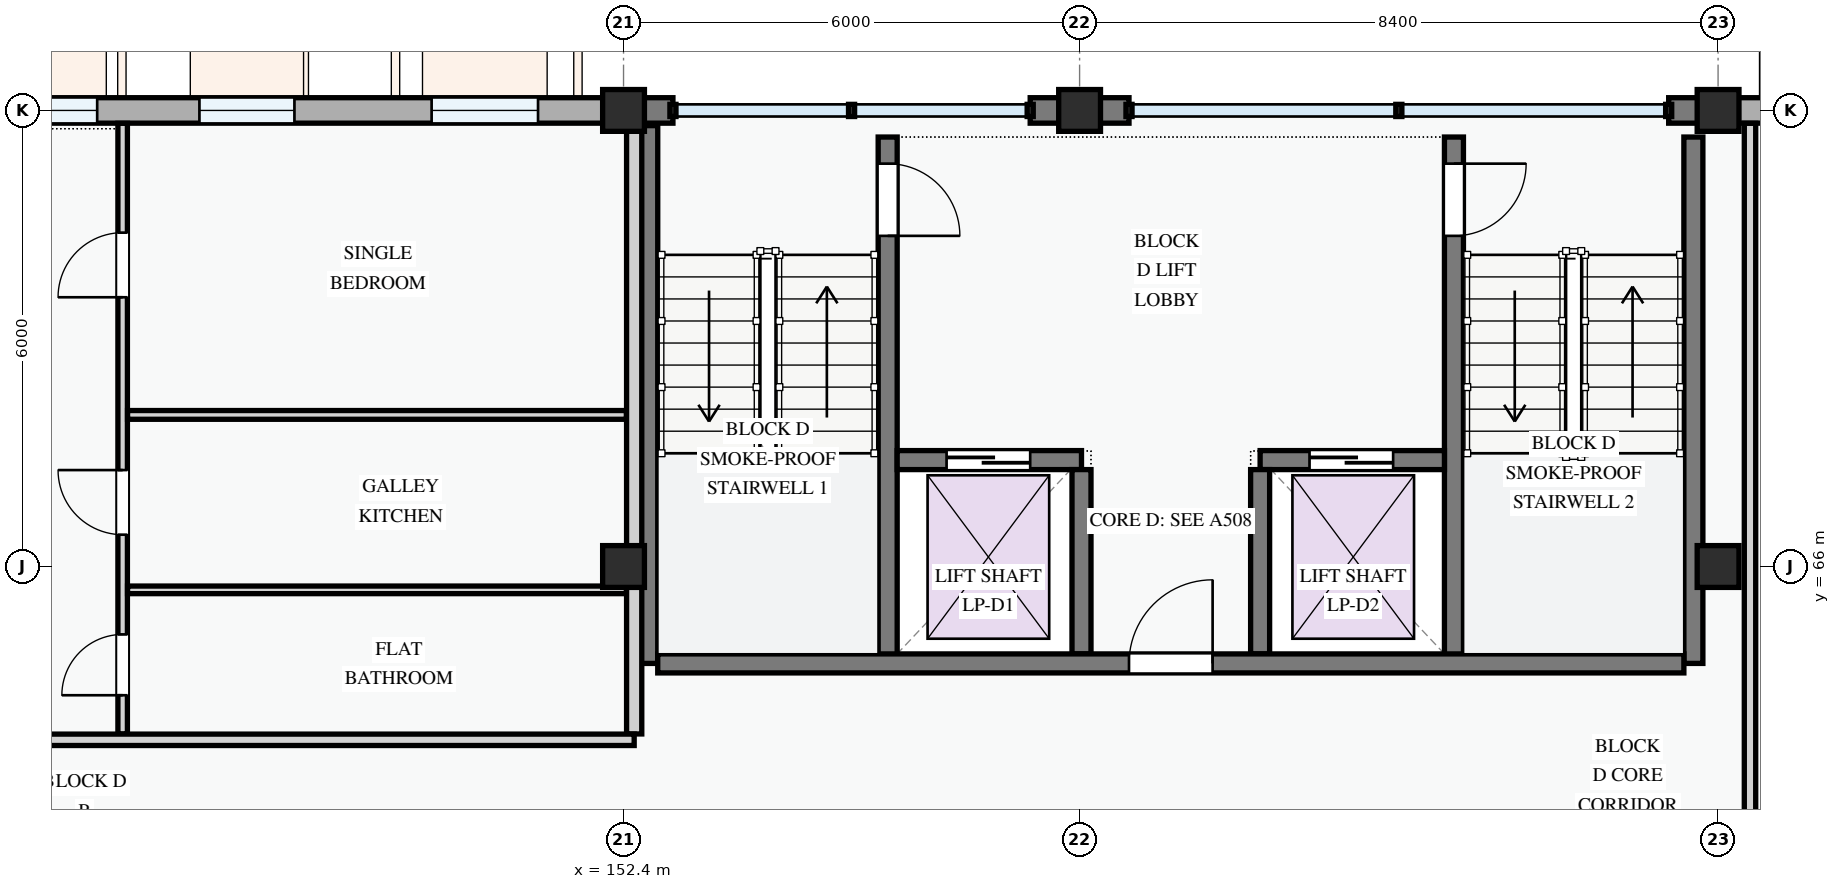
"""IFC4 building model, lengths in metres.
Left out: names, types, materials, properties, quantities, classifications, styles, units other than length and angle.
Written with IfcOpenShell. Run it as: python <this file> out.ifc"""

import sys

from ifc_helpers import new_model, si_unit, direction, frame, frame_2d, origin, origin_2d, place, context, subcontext, project, spatial, rectangle, extrude, element, fill, save


model = new_model("IFC4")
c1 = context("Model", 3, precision=1e-05, world=origin(), true_north=direction((0.0, 1.0)))
c2 = subcontext(c1, "Body", "Model", "MODEL_VIEW")
j1 = project(units=[si_unit("LENGTHUNIT", "METRE"), si_unit("PLANEANGLEUNIT", "RADIAN")], contexts=[c1])
p1 = place(None, origin())
s1 = spatial("IfcSite", under=j1, at=p1, CompositionType="ELEMENT")
p2 = place(p1, origin())
s2 = spatial("IfcBuilding", under=s1, at=p2, CompositionType="ELEMENT")
p3 = place(p2, frame((0.0, 0.0, 8.1)))
s3 = spatial("IfcBuildingStorey", under=s2, at=p3, CompositionType="ELEMENT", Elevation=8.1)
for number, where, z_axis, x_axis in (
    (1, (152.4, 66.0, 0.0), (0.0, 0.0, 1.0), (1.0, 0.0, 0.0)),
    (2, (152.4, 72.0, 0.0), (0.0, 0.0, 1.0), (1.0, 0.0, 0.0)),
    (3, (158.4, 72.0, 0.0), (0.0, 0.0, 1.0), (1.0, 0.0, 0.0)),
    (4, (166.8, 66.0, 0.0), (0.0, 0.0, 1.0), (1.0, 0.0, 0.0)),
    (5, (166.8, 72.0, 0.0), (0.0, 0.0, 1.0), (1.0, 0.0, 0.0)),
):
    element("IfcColumn", number, at=place(p3, frame(where, z_axis=z_axis, x_axis=x_axis)), inside=s3, PredefinedType="COLUMN", context=c2, shape_type="SweptSolid", body=[
        extrude(rectangle(XDim=0.55, YDim=0.55, at=origin_2d()), origin(), (0.0, 0.0, 1.0), 3.3),
    ])
p4 = place(p3, frame((152.4, 72.0, 0.0), z_axis=(0.0, 0.0, 1.0), x_axis=(-1.0, 0.0, 0.0)))
e6 = element("IfcWall", 6, at=p4, inside=s3, PredefinedType="STANDARD", context=c2, shape_type="SweptSolid", body=[
    extrude(rectangle(XDim=8.4, YDim=0.335, at=frame_2d((4.2, 0.0))), origin(), (0.0, 0.0, 1.0), 2.375),
])
p5 = place(p4, frame((1.125, 0.0, 0.78)))
e7 = element("IfcOpeningElement", 7, at=p5, cuts=e6, PredefinedType="OPENING", context=c2, shape_type="SweptSolid", body=[
    extrude(rectangle(XDim=1.4, YDim=1.45, at=frame_2d((0.7, 0.725))), frame((0.0, 0.177, 0.0), z_axis=(0.0, -1.0, 0.0), x_axis=(1.0, 0.0, 0.0)), (0.0, 0.0, 1.0), 0.355),
])
p6 = place(p4, frame((4.33, 0.0, 0.78)))
e8 = element("IfcOpeningElement", 8, at=p6, cuts=e6, PredefinedType="OPENING", context=c2, shape_type="SweptSolid", body=[
    extrude(rectangle(XDim=1.25, YDim=1.45, at=frame_2d((0.625, 0.725))), frame((0.0, 0.177, 0.0), z_axis=(0.0, -1.0, 0.0), x_axis=(1.0, 0.0, 0.0)), (0.0, 0.0, 1.0), 0.355),
])
p7 = place(p4, frame((6.925, 0.0, 0.78)))
e9 = element("IfcOpeningElement", 9, at=p7, cuts=e6, PredefinedType="OPENING", context=c2, shape_type="SweptSolid", body=[
    extrude(rectangle(XDim=0.95, YDim=1.15, at=frame_2d((0.475, 0.575))), frame((0.0, 0.177, 0.0), z_axis=(0.0, -1.0, 0.0), x_axis=(1.0, 0.0, 0.0)), (0.0, 0.0, 1.0), 0.355),
])
p8 = place(p3, frame((174.0, 72.0, 0.0), z_axis=(0.0, 0.0, 1.0), x_axis=(-1.0, 0.0, 0.0)))
e10 = element("IfcWall", 10, at=p8, inside=s3, PredefinedType="STANDARD", context=c2, shape_type="SweptSolid", body=[
    extrude(rectangle(XDim=7.2, YDim=0.335, at=frame_2d((3.6, 0.0))), origin(), (0.0, 0.0, 1.0), 2.375),
])
p9 = place(p8, frame((0.913, 0.0, 0.78)))
e11 = element("IfcOpeningElement", 11, at=p9, cuts=e10, PredefinedType="OPENING", context=c2, shape_type="SweptSolid", body=[
    extrude(rectangle(XDim=1.92, YDim=1.44, at=frame_2d((0.96, 0.72))), frame((0.0, 0.177, 0.0), z_axis=(0.0, -1.0, 0.0), x_axis=(1.0, 0.0, 0.0)), (0.0, 0.0, 1.0), 0.355),
])
p10 = place(p8, frame((3.808, 0.0, 0.78)))
e12 = element("IfcOpeningElement", 12, at=p10, cuts=e10, PredefinedType="OPENING", context=c2, shape_type="SweptSolid", body=[
    extrude(rectangle(XDim=2.58, YDim=1.48, at=frame_2d((1.29, 0.74))), frame((0.0, 0.177, 0.0), z_axis=(0.0, -1.0, 0.0), x_axis=(1.0, 0.0, 0.0)), (0.0, 0.0, 1.0), 0.355),
])
for number, where, z_axis, x_axis in (
    (13, (166.8, 72.0, 0.0), (0.0, 0.0, 1.0), (-1.0, 0.0, 0.0)),
    (14, (159.05, 72.0, 0.0), (0.0, 0.0, 1.0), (-1.0, 0.0, 0.0)),
):
    element("IfcWall", number, at=place(p3, frame(where, z_axis=z_axis, x_axis=x_axis)), inside=s3, PredefinedType="STANDARD", context=c2, shape_type="SweptSolid", body=[
        extrude(rectangle(XDim=0.65, YDim=0.335, at=frame_2d((0.325, 0.0))), origin(), (0.0, 0.0, 1.0), 3.04),
    ])
p11 = place(p3, frame((158.4, 72.0, 0.0), z_axis=(0.0, 0.0, 1.0), x_axis=(-1.0, 0.0, 0.0)))
e15 = element("IfcWall", 15, at=p11, inside=s3, PredefinedType="STANDARD", context=c2, shape_type="SweptSolid", body=[
    extrude(rectangle(XDim=0.65, YDim=0.335, at=frame_2d((0.325, 0.0))), origin(), (0.0, 0.0, 1.0), 3.04),
])
p12 = place(p3, frame((153.05, 72.0, 0.0), z_axis=(0.0, 0.0, 1.0), x_axis=(-1.0, 0.0, 0.0)))
e16 = element("IfcWall", 16, at=p12, inside=s3, PredefinedType="STANDARD", context=c2, shape_type="SweptSolid", body=[
    extrude(rectangle(XDim=0.65, YDim=0.335, at=frame_2d((0.325, 0.0))), origin(), (0.0, 0.0, 1.0), 3.04),
])
p13 = place(p3, frame((155.875, 71.65, 0.0), z_axis=(0.0, 0.0, 1.0), x_axis=(0.0, -1.0, 0.0)))
e17 = element("IfcWall", 17, at=p13, inside=s3, PredefinedType="SHEAR", context=c2, shape_type="SweptSolid", body=[
    extrude(rectangle(XDim=6.925, YDim=0.25, at=frame_2d((3.462, 0.0))), origin(), (0.0, 0.0, 1.0), 3.0),
])
p14 = place(p13, frame((0.35, 0.0, 0.0)))
e18 = element("IfcOpeningElement", 18, at=p14, cuts=e17, PredefinedType="OPENING", context=c2, shape_type="SweptSolid", body=[
    extrude(rectangle(XDim=0.95, YDim=2.1, at=frame_2d((0.475, 1.05))), frame((0.0, 0.135, 0.0), z_axis=(0.0, -1.0, 0.0), x_axis=(1.0, 0.0, 0.0)), (0.0, 0.0, 1.0), 0.27),
])
p15 = place(p3, frame((152.725, 71.8, 0.0), z_axis=(0.0, 0.0, 1.0), x_axis=(0.0, -1.0, 0.0)))
e19 = element("IfcWall", 19, at=p15, inside=s3, PredefinedType="SHEAR", context=c2, shape_type="SweptSolid", body=[
    extrude(rectangle(XDim=7.075, YDim=0.25, at=frame_2d((3.538, 0.0))), origin(), (0.0, 0.0, 1.0), 3.0),
])
p16 = place(p3, frame((166.475, 71.65, 0.0), z_axis=(0.0, 0.0, 1.0), x_axis=(0.0, -1.0, 0.0)))
e20 = element("IfcWall", 20, at=p16, inside=s3, PredefinedType="SHEAR", context=c2, shape_type="SweptSolid", body=[
    extrude(rectangle(XDim=6.925, YDim=0.25, at=frame_2d((3.462, 0.0))), origin(), (0.0, 0.0, 1.0), 3.0),
])
p17 = place(p3, frame((163.325, 71.65, 0.0), z_axis=(0.0, 0.0, 1.0), x_axis=(0.0, -1.0, 0.0)))
e21 = element("IfcWall", 21, at=p17, inside=s3, PredefinedType="SHEAR", context=c2, shape_type="SweptSolid", body=[
    extrude(rectangle(XDim=6.925, YDim=0.25, at=frame_2d((3.462, 0.0))), origin(), (0.0, 0.0, 1.0), 3.0),
])
p18 = place(p17, frame((0.35, 0.0, 0.0)))
e22 = element("IfcOpeningElement", 22, at=p18, cuts=e21, PredefinedType="OPENING", context=c2, shape_type="SweptSolid", body=[
    extrude(rectangle(XDim=0.95, YDim=2.1, at=frame_2d((0.475, 1.05))), frame((0.0, 0.135, 0.0), z_axis=(0.0, -1.0, 0.0), x_axis=(1.0, 0.0, 0.0)), (0.0, 0.0, 1.0), 0.27),
])
p19 = place(p3, frame((156.0, 67.4, 0.0), z_axis=(0.0, 0.0, 1.0), x_axis=(1.0, 0.0, 0.0)))
e23 = element("IfcWall", 23, at=p19, inside=s3, PredefinedType="SHEAR", context=c2, shape_type="SweptSolid", body=[
    extrude(rectangle(XDim=2.425, YDim=0.25, at=frame_2d((1.212, 0.0))), origin(), (0.0, 0.0, 1.0), 3.0),
])
p20 = place(p19, frame((0.65, 0.0, 0.0)))
e24 = element("IfcOpeningElement", 24, at=p20, cuts=e23, PredefinedType="OPENING", context=c2, shape_type="SweptSolid", body=[
    extrude(rectangle(XDim=1.1, YDim=2.15, at=frame_2d((0.55, 1.075))), frame((0.0, 0.135, 0.0), z_axis=(0.0, -1.0, 0.0), x_axis=(1.0, 0.0, 0.0)), (0.0, 0.0, 1.0), 0.27),
])
p21 = place(p3, frame((160.775, 67.4, 0.0), z_axis=(0.0, 0.0, 1.0), x_axis=(1.0, 0.0, 0.0)))
e25 = element("IfcWall", 25, at=p21, inside=s3, PredefinedType="SHEAR", context=c2, shape_type="SweptSolid", body=[
    extrude(rectangle(XDim=2.425, YDim=0.25, at=frame_2d((1.212, 0.0))), origin(), (0.0, 0.0, 1.0), 3.0),
])
p22 = place(p21, frame((0.65, 0.0, 0.0)))
e26 = element("IfcOpeningElement", 26, at=p22, cuts=e25, PredefinedType="OPENING", context=c2, shape_type="SweptSolid", body=[
    extrude(rectangle(XDim=1.1, YDim=2.15, at=frame_2d((0.55, 1.075))), frame((0.0, 0.135, 0.0), z_axis=(0.0, -1.0, 0.0), x_axis=(1.0, 0.0, 0.0)), (0.0, 0.0, 1.0), 0.27),
])
for number, where, z_axis, x_axis in (
    (27, (158.425, 67.275, 0.0), (0.0, 0.0, 1.0), (0.0, -1.0, 0.0)),
    (28, (160.775, 67.275, 0.0), (0.0, 0.0, 1.0), (0.0, -1.0, 0.0)),
):
    element("IfcWall", number, at=place(p3, frame(where, z_axis=z_axis, x_axis=x_axis)), inside=s3, PredefinedType="SHEAR", context=c2, shape_type="SweptSolid", body=[
        extrude(rectangle(XDim=2.425, YDim=0.25, at=frame_2d((1.212, 0.0))), origin(), (0.0, 0.0, 1.0), 3.0),
    ])
p23 = place(p3, frame((152.85, 64.725, 0.0), z_axis=(0.0, 0.0, 1.0), x_axis=(1.0, 0.0, 0.0)))
e29 = element("IfcWall", 29, at=p23, inside=s3, PredefinedType="SHEAR", context=c2, shape_type="SweptSolid", body=[
    extrude(rectangle(XDim=13.5, YDim=0.25, at=frame_2d((6.75, 0.0))), origin(), (0.0, 0.0, 1.0), 3.0),
])
p24 = place(p23, frame((6.2, 0.0, 0.0)))
e30 = element("IfcOpeningElement", 30, at=p24, cuts=e29, PredefinedType="OPENING", context=c2, shape_type="SweptSolid", body=[
    extrude(rectangle(XDim=1.1, YDim=2.15, at=frame_2d((0.55, 1.075))), frame((0.0, 0.135, 0.0), z_axis=(0.0, -1.0, 0.0), x_axis=(1.0, 0.0, 0.0)), (0.0, 0.0, 1.0), 0.27),
])
p25 = place(p3, frame((167.22, 57.852, 0.0), z_axis=(0.0, 0.0, 1.0), x_axis=(0.0, 1.0, 0.0)))
e31 = element("IfcWall", 31, at=p25, inside=s3, PredefinedType="PARTITIONING", context=c2, shape_type="SweptSolid", body=[
    extrude(rectangle(XDim=13.979, YDim=0.15, at=frame_2d((6.989, 0.0))), origin(), (0.0, 0.0, 1.0), 2.425),
])
p26 = place(p25, frame((2.438, 0.0, 0.0)))
e32 = element("IfcOpeningElement", 32, at=p26, cuts=e31, PredefinedType="OPENING", context=c2, shape_type="SweptSolid", body=[
    extrude(rectangle(XDim=0.92, YDim=2.1, at=frame_2d((0.46, 1.05))), frame((0.0, 0.085, 0.0), z_axis=(0.0, -1.0, 0.0), x_axis=(1.0, 0.0, 0.0)), (0.0, 0.0, 1.0), 0.17),
])
p27 = place(p3, frame((145.81, 63.797, 0.0), z_axis=(0.0, 0.0, 1.0), x_axis=(0.0, 1.0, 0.0)))
e33 = element("IfcWall", 33, at=p27, inside=s3, PredefinedType="PARTITIONING", context=c2, shape_type="SweptSolid", body=[
    extrude(rectangle(XDim=8.033, YDim=0.125, at=frame_2d((4.017, 0.0))), origin(), (0.0, 0.0, 1.0), 3.0),
])
p28 = place(p27, frame((0.51, 0.0, 0.0)))
e34 = element("IfcOpeningElement", 34, at=p28, cuts=e33, PredefinedType="OPENING", context=c2, shape_type="SweptSolid", body=[
    extrude(rectangle(XDim=0.8, YDim=2.1, at=frame_2d((0.4, 1.05))), frame((0.0, 0.073, 0.0), z_axis=(0.0, -1.0, 0.0), x_axis=(1.0, 0.0, 0.0)), (0.0, 0.0, 1.0), 0.145),
])
p29 = place(p27, frame((2.622, 0.0, 0.0)))
e35 = element("IfcOpeningElement", 35, at=p29, cuts=e33, PredefinedType="OPENING", context=c2, shape_type="SweptSolid", body=[
    extrude(rectangle(XDim=0.85, YDim=2.1, at=frame_2d((0.425, 1.05))), frame((0.0, 0.073, 0.0), z_axis=(0.0, -1.0, 0.0), x_axis=(1.0, 0.0, 0.0)), (0.0, 0.0, 1.0), 0.145),
])
p30 = place(p27, frame((5.745, 0.0, 0.0)))
e36 = element("IfcOpeningElement", 36, at=p30, cuts=e33, PredefinedType="OPENING", context=c2, shape_type="SweptSolid", body=[
    extrude(rectangle(XDim=0.85, YDim=2.1, at=frame_2d((0.425, 1.05))), frame((0.0, 0.073, 0.0), z_axis=(0.0, -1.0, 0.0), x_axis=(1.0, 0.0, 0.0)), (0.0, 0.0, 1.0), 0.145),
])
p31 = place(p3, frame((145.875, 67.994, 0.0), z_axis=(0.0, 0.0, 1.0), x_axis=(1.0, 0.0, 0.0)))
e37 = element("IfcWall", 37, at=p31, inside=s3, PredefinedType="PARTITIONING", context=c2, shape_type="SweptSolid", body=[
    extrude(rectangle(XDim=6.563, YDim=0.115, at=frame_2d((3.281, 0.0))), origin(), (0.0, 0.0, 1.0), 3.0),
])
p32 = place(p3, frame((145.875, 65.693, 0.0), z_axis=(0.0, 0.0, 1.0), x_axis=(1.0, 0.0, 0.0)))
e38 = element("IfcWall", 38, at=p32, inside=s3, PredefinedType="PARTITIONING", context=c2, shape_type="SweptSolid", body=[
    extrude(rectangle(XDim=6.563, YDim=0.1, at=frame_2d((3.281, 0.0))), origin(), (0.0, 0.0, 1.0), 2.375),
])
p33 = place(p3, frame((152.54, 63.797, 0.0), z_axis=(0.0, 0.0, 1.0), x_axis=(0.0, 1.0, 0.0)))
e39 = element("IfcWall", 39, at=p33, inside=s3, PredefinedType="PARTITIONING", context=c2, shape_type="SweptSolid", body=[
    extrude(rectangle(XDim=8.033, YDim=0.2, at=frame_2d((4.017, 0.0))), origin(), (0.0, 0.0, 1.0), 2.425),
])
p34 = place(p3, frame((138.169, 63.72, 0.0), z_axis=(0.0, 0.0, 1.0), x_axis=(1.0, 0.0, 0.0)))
e40 = element("IfcWall", 40, at=p34, inside=s3, PredefinedType="PARTITIONING", context=c2, shape_type="SweptSolid", body=[
    extrude(rectangle(XDim=14.371, YDim=0.15, at=frame_2d((7.185, 0.0))), origin(), (0.0, 0.0, 1.0), 3.0),
])
p35 = place(p34, frame((2.303, 0.0, 0.0)))
e41 = element("IfcOpeningElement", 41, at=p35, cuts=e40, PredefinedType="OPENING", context=c2, shape_type="SweptSolid", body=[
    extrude(rectangle(XDim=0.92, YDim=2.1, at=frame_2d((0.46, 1.05))), frame((0.0, 0.085, 0.0), z_axis=(0.0, -1.0, 0.0), x_axis=(1.0, 0.0, 0.0)), (0.0, 0.0, 1.0), 0.17),
])
p36 = place(p5, origin())
e42 = element("IfcWindow", 42, at=p36, inside=s3, PartitioningType="SINGLE_PANEL", PredefinedType="WINDOW", context=c2, shape_type="SweptSolid", body=[
    extrude(rectangle(XDim=1.4, YDim=1.45, at=frame_2d((0.7, 0.725))), frame((0.0, 0.03, 0.0), z_axis=(0.0, -1.0, 0.0), x_axis=(1.0, 0.0, 0.0)), (0.0, 0.0, 1.0), 0.06),
])
fill(e7, e42)
p37 = place(p6, origin())
e43 = element("IfcWindow", 43, at=p37, inside=s3, PartitioningType="SINGLE_PANEL", PredefinedType="WINDOW", context=c2, shape_type="SweptSolid", body=[
    extrude(rectangle(XDim=1.25, YDim=1.45, at=frame_2d((0.625, 0.725))), frame((0.0, 0.03, 0.0), z_axis=(0.0, -1.0, 0.0), x_axis=(1.0, 0.0, 0.0)), (0.0, 0.0, 1.0), 0.06),
])
fill(e8, e43)
p38 = place(p7, origin())
e44 = element("IfcWindow", 44, at=p38, inside=s3, PartitioningType="SINGLE_PANEL", PredefinedType="WINDOW", context=c2, shape_type="SweptSolid", body=[
    extrude(rectangle(XDim=0.95, YDim=1.15, at=frame_2d((0.475, 0.575))), frame((0.0, 0.03, 0.0), z_axis=(0.0, -1.0, 0.0), x_axis=(1.0, 0.0, 0.0)), (0.0, 0.0, 1.0), 0.06),
])
fill(e9, e44)
p39 = place(p14, origin())
e45 = element("IfcDoor", 45, at=p39, inside=s3, OperationType="SINGLE_SWING_RIGHT", PredefinedType="DOOR", context=c2, shape_type="SweptSolid", body=[
    extrude(rectangle(XDim=0.95, YDim=2.1, at=frame_2d((0.475, 1.05))), frame((0.0, 0.025, 0.0), z_axis=(0.0, -1.0, 0.0), x_axis=(1.0, 0.0, 0.0)), (0.0, 0.0, 1.0), 0.05),
])
fill(e18, e45)
p40 = place(p18, origin())
e46 = element("IfcDoor", 46, at=p40, inside=s3, OperationType="SINGLE_SWING_LEFT", PredefinedType="DOOR", context=c2, shape_type="SweptSolid", body=[
    extrude(rectangle(XDim=0.95, YDim=2.1, at=frame_2d((0.475, 1.05))), frame((0.0, 0.025, 0.0), z_axis=(0.0, -1.0, 0.0), x_axis=(1.0, 0.0, 0.0)), (0.0, 0.0, 1.0), 0.05),
])
fill(e22, e46)
p41 = place(p20, origin())
e47 = element("IfcDoor", 47, at=p41, inside=s3, OperationType="SLIDING_TO_LEFT", PredefinedType="DOOR", context=c2, shape_type="SweptSolid", body=[
    extrude(rectangle(XDim=1.1, YDim=2.15, at=frame_2d((0.55, 1.075))), frame((0.0, 0.025, 0.0), z_axis=(0.0, -1.0, 0.0), x_axis=(1.0, 0.0, 0.0)), (0.0, 0.0, 1.0), 0.05),
])
fill(e24, e47)
p42 = place(p22, origin())
e48 = element("IfcDoor", 48, at=p42, inside=s3, OperationType="SLIDING_TO_LEFT", PredefinedType="DOOR", context=c2, shape_type="SweptSolid", body=[
    extrude(rectangle(XDim=1.1, YDim=2.15, at=frame_2d((0.55, 1.075))), frame((0.0, 0.025, 0.0), z_axis=(0.0, -1.0, 0.0), x_axis=(1.0, 0.0, 0.0)), (0.0, 0.0, 1.0), 0.05),
])
fill(e26, e48)
p43 = place(p24, origin())
e49 = element("IfcDoor", 49, at=p43, inside=s3, OperationType="SINGLE_SWING_RIGHT", PredefinedType="DOOR", context=c2, shape_type="SweptSolid", body=[
    extrude(rectangle(XDim=1.1, YDim=2.15, at=frame_2d((0.55, 1.075))), frame((0.0, 0.025, 0.0), z_axis=(0.0, -1.0, 0.0), x_axis=(1.0, 0.0, 0.0)), (0.0, 0.0, 1.0), 0.05),
])
fill(e30, e49)
p44 = place(p28, origin())
e50 = element("IfcDoor", 50, at=p44, inside=s3, OperationType="SINGLE_SWING_LEFT", PredefinedType="DOOR", context=c2, shape_type="SweptSolid", body=[
    extrude(rectangle(XDim=0.8, YDim=2.1, at=frame_2d((0.4, 1.05))), frame((0.0, 0.025, 0.0), z_axis=(0.0, -1.0, 0.0), x_axis=(1.0, 0.0, 0.0)), (0.0, 0.0, 1.0), 0.05),
])
fill(e34, e50)
p45 = place(p29, origin())
e51 = element("IfcDoor", 51, at=p45, inside=s3, OperationType="SINGLE_SWING_RIGHT", PredefinedType="DOOR", context=c2, shape_type="SweptSolid", body=[
    extrude(rectangle(XDim=0.85, YDim=2.1, at=frame_2d((0.425, 1.05))), frame((0.0, 0.025, 0.0), z_axis=(0.0, -1.0, 0.0), x_axis=(1.0, 0.0, 0.0)), (0.0, 0.0, 1.0), 0.05),
])
fill(e35, e51)
p46 = place(p30, origin())
e52 = element("IfcDoor", 52, at=p46, inside=s3, OperationType="SINGLE_SWING_LEFT", PredefinedType="DOOR", context=c2, shape_type="SweptSolid", body=[
    extrude(rectangle(XDim=0.85, YDim=2.1, at=frame_2d((0.425, 1.05))), frame((0.0, 0.025, 0.0), z_axis=(0.0, -1.0, 0.0), x_axis=(1.0, 0.0, 0.0)), (0.0, 0.0, 1.0), 0.05),
])
fill(e36, e52)
save(model, sys.argv[1])
